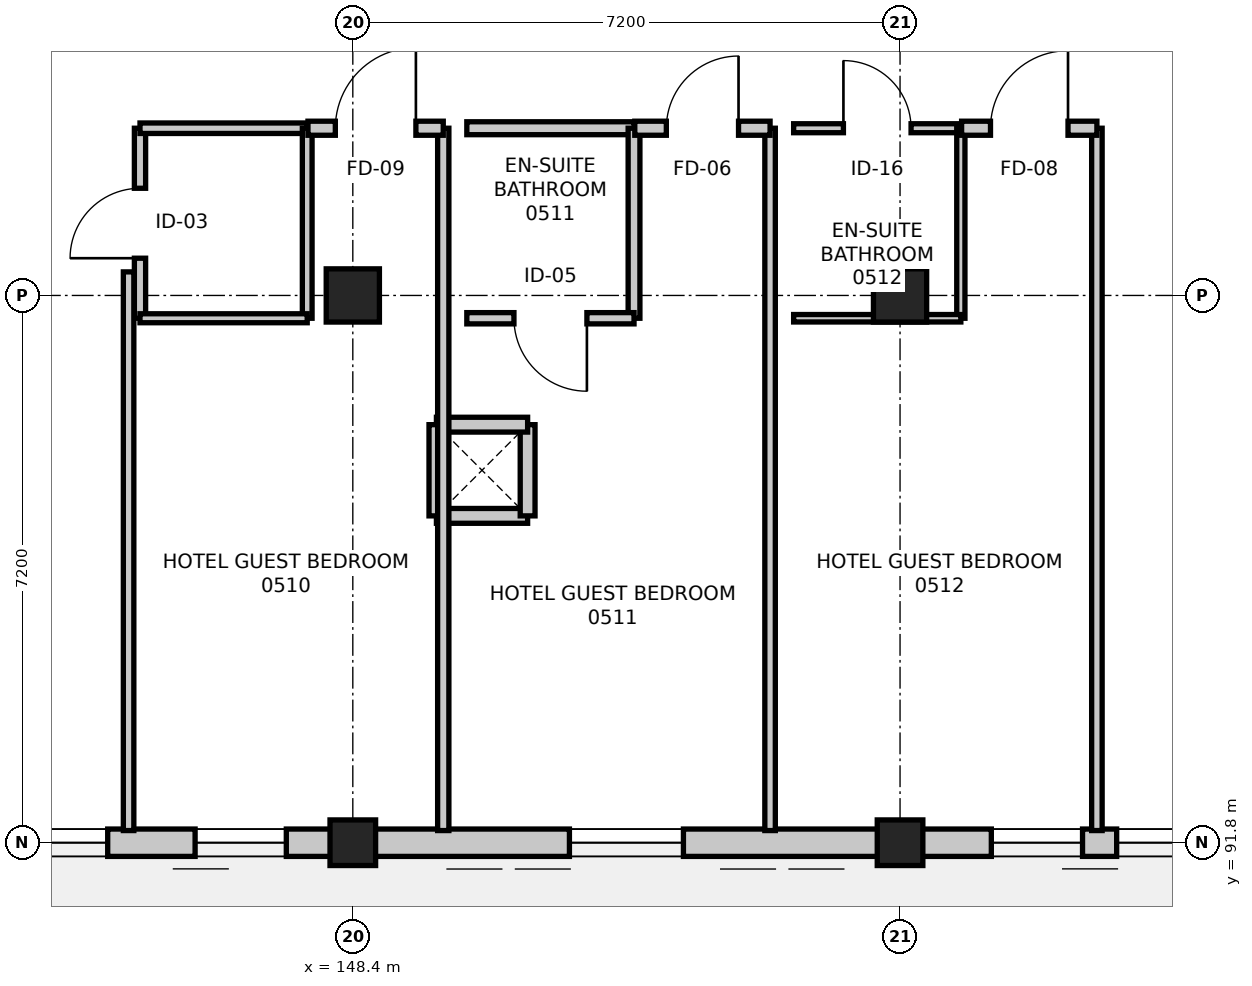
"""IFC4 building model, lengths in metres.
Left out: names, types, materials, properties, quantities, classifications, styles, units other than length and angle.
Written with IfcOpenShell. Run it as: python <this file> out.ifc"""

import sys

from ifc_helpers import new_model, si_unit, direction, frame, frame_2d, origin, origin_2d, place, context, subcontext, project, spatial, rectangle, extrude, element, fill, save


model = new_model("IFC4")
c1 = context("Model", 3, precision=1e-05, world=origin(), true_north=direction((0.0, 1.0)))
c2 = subcontext(c1, "Body", "Model", "MODEL_VIEW")
j1 = project(units=[si_unit("LENGTHUNIT", "METRE"), si_unit("PLANEANGLEUNIT", "RADIAN")], contexts=[c1])
p1 = place(None, origin())
s1 = spatial("IfcSite", under=j1, at=p1, CompositionType="ELEMENT")
p2 = place(p1, origin())
s2 = spatial("IfcBuilding", under=s1, at=p2, CompositionType="ELEMENT")
p3 = place(p2, frame((0.0, 0.0, 22.8)))
s3 = spatial("IfcBuildingStorey", under=s2, at=p3, CompositionType="ELEMENT", Elevation=22.8)
p4 = place(p3, frame((148.4, 91.8, 0.0), z_axis=(0.0, 0.0, 1.0), x_axis=(1.0, 0.0, 0.0)))
e1 = element("IfcColumn", 1, at=p4, inside=s3, PredefinedType="COLUMN", context=c2, shape_type="SweptSolid", body=[
    extrude(rectangle(XDim=0.6, YDim=0.6, at=origin_2d()), origin(), (0.0, 0.0, 1.0), 3.6),
])
p5 = place(p3, frame((148.4, 99.0, 0.0), z_axis=(0.0, 0.0, 1.0), x_axis=(1.0, 0.0, 0.0)))
e2 = element("IfcColumn", 2, at=p5, inside=s3, PredefinedType="COLUMN", context=c2, shape_type="SweptSolid", body=[
    extrude(rectangle(XDim=0.7, YDim=0.7, at=origin_2d()), origin(), (0.0, 0.0, 1.0), 3.6),
])
p6 = place(p3, frame((155.6, 91.8, 0.0), z_axis=(0.0, 0.0, 1.0), x_axis=(1.0, 0.0, 0.0)))
e3 = element("IfcColumn", 3, at=p6, inside=s3, PredefinedType="COLUMN", context=c2, shape_type="SweptSolid", body=[
    extrude(rectangle(XDim=0.6, YDim=0.6, at=origin_2d()), origin(), (0.0, 0.0, 1.0), 3.6),
])
p7 = place(p3, frame((155.6, 99.0, 0.0), z_axis=(0.0, 0.0, 1.0), x_axis=(1.0, 0.0, 0.0)))
e4 = element("IfcColumn", 4, at=p7, inside=s3, PredefinedType="COLUMN", context=c2, shape_type="SweptSolid", body=[
    extrude(rectangle(XDim=0.7, YDim=0.7, at=origin_2d()), origin(), (0.0, 0.0, 1.0), 3.6),
])
p8 = place(p3, frame((162.8, 91.8, 0.0), z_axis=(0.0, 0.0, 1.0), x_axis=(-1.0, 0.0, 0.0)))
e5 = element("IfcWall", 5, at=p8, inside=s3, PredefinedType="STANDARD", context=c2, shape_type="SweptSolid", body=[
    extrude(rectangle(XDim=7.2, YDim=0.36, at=frame_2d((3.6, 0.0))), origin(), (0.0, 0.0, 1.0), 2.735),
])
p9 = place(p8, frame((2.85, 0.0, 0.75)))
e6 = element("IfcOpeningElement", 6, at=p9, cuts=e5, PredefinedType="OPENING", context=c2, shape_type="SweptSolid", body=[
    extrude(rectangle(XDim=1.5, YDim=1.5, at=frame_2d((0.75, 0.75))), frame((0.0, 0.19, 0.0), z_axis=(0.0, -1.0, 0.0), x_axis=(1.0, 0.0, 0.0)), (0.0, 0.0, 1.0), 0.38),
])
p10 = place(p8, frame((4.799, 0.0, 0.85)))
e7 = element("IfcOpeningElement", 7, at=p10, cuts=e5, PredefinedType="OPENING", context=c2, shape_type="SweptSolid", body=[
    extrude(rectangle(XDim=1.2, YDim=1.8, at=frame_2d((0.6, 0.9))), frame((0.0, 0.19, 0.0), z_axis=(0.0, -1.0, 0.0), x_axis=(1.0, 0.0, 0.0)), (0.0, 0.0, 1.0), 0.38),
])
p11 = place(p3, frame((155.6, 91.8, 0.0), z_axis=(0.0, 0.0, 1.0), x_axis=(-1.0, 0.0, 0.0)))
e8 = element("IfcWall", 8, at=p11, inside=s3, PredefinedType="STANDARD", context=c2, shape_type="SweptSolid", body=[
    extrude(rectangle(XDim=7.2, YDim=0.36, at=frame_2d((3.6, 0.0))), origin(), (0.0, 0.0, 1.0), 2.735),
])
p12 = place(p11, frame((2.85, 0.0, 0.75)))
e9 = element("IfcOpeningElement", 9, at=p12, cuts=e8, PredefinedType="OPENING", context=c2, shape_type="SweptSolid", body=[
    extrude(rectangle(XDim=1.5, YDim=1.5, at=frame_2d((0.75, 0.75))), frame((0.0, 0.19, 0.0), z_axis=(0.0, -1.0, 0.0), x_axis=(1.0, 0.0, 0.0)), (0.0, 0.0, 1.0), 0.38),
])
p13 = place(p3, frame((148.4, 91.8, 0.0), z_axis=(0.0, 0.0, 1.0), x_axis=(-1.0, 0.0, 0.0)))
e10 = element("IfcWall", 10, at=p13, inside=s3, PredefinedType="STANDARD", context=c2, shape_type="SweptSolid", body=[
    extrude(rectangle(XDim=7.2, YDim=0.36, at=frame_2d((3.6, 0.0))), origin(), (0.0, 0.0, 1.0), 2.735),
])
p14 = place(p13, frame((0.875, 0.0, 0.75)))
e11 = element("IfcOpeningElement", 11, at=p14, cuts=e10, PredefinedType="OPENING", context=c2, shape_type="SweptSolid", body=[
    extrude(rectangle(XDim=1.2, YDim=1.5, at=frame_2d((0.6, 0.75))), frame((0.0, 0.19, 0.0), z_axis=(0.0, -1.0, 0.0), x_axis=(1.0, 0.0, 0.0)), (0.0, 0.0, 1.0), 0.38),
])
p15 = place(p13, frame((3.225, 0.0, 0.75)))
e12 = element("IfcOpeningElement", 12, at=p15, cuts=e10, PredefinedType="OPENING", context=c2, shape_type="SweptSolid", body=[
    extrude(rectangle(XDim=1.2, YDim=1.5, at=frame_2d((0.6, 0.75))), frame((0.0, 0.19, 0.0), z_axis=(0.0, -1.0, 0.0), x_axis=(1.0, 0.0, 0.0)), (0.0, 0.0, 1.0), 0.38),
])
p16 = place(p13, frame((5.35, 0.0, 0.75)))
e13 = element("IfcOpeningElement", 13, at=p16, cuts=e10, PredefinedType="OPENING", context=c2, shape_type="SweptSolid", body=[
    extrude(rectangle(XDim=1.2, YDim=1.5, at=frame_2d((0.6, 0.75))), frame((0.0, 0.19, 0.0), z_axis=(0.0, -1.0, 0.0), x_axis=(1.0, 0.0, 0.0)), (0.0, 0.0, 1.0), 0.38),
])
for number, where, z_axis, x_axis in (
    (14, (149.5, 96.1, 0.0), (0.0, 0.0, 1.0), (1.0, 0.0, 0.0)),
    (15, (150.7, 96.1, 0.0), (0.0, 0.0, 1.0), (0.0, 1.0, 0.0)),
    (16, (150.7, 97.3, 0.0), (0.0, 0.0, 1.0), (-1.0, 0.0, 0.0)),
    (17, (149.5, 97.3, 0.0), (0.0, 0.0, 1.0), (0.0, -1.0, 0.0)),
):
    element("IfcWall", number, at=place(p3, frame(where, z_axis=z_axis, x_axis=x_axis)), inside=s3, PredefinedType="PARAPET", context=c2, shape_type="SweptSolid", body=[
        extrude(rectangle(XDim=1.2, YDim=0.195, at=frame_2d((0.6, 0.0))), origin(), (0.0, 0.0, 1.0), 3.35),
    ])
p17 = place(p3, frame((145.6, 98.7, 0.0), z_axis=(0.0, 0.0, 1.0), x_axis=(0.0, 1.0, 0.0)))
e18 = element("IfcWall", 18, at=p17, inside=s3, PredefinedType="PARTITIONING", context=c2, shape_type="SweptSolid", body=[
    extrude(rectangle(XDim=2.5, YDim=0.148, at=frame_2d((1.25, 0.0))), origin(), (0.0, 0.0, 1.0), 2.735),
])
p18 = place(p17, frame((0.79, 0.0, 0.0)))
e19 = element("IfcOpeningElement", 19, at=p18, cuts=e18, PredefinedType="OPENING", context=c2, shape_type="SweptSolid", body=[
    extrude(rectangle(XDim=0.92, YDim=2.1, at=frame_2d((0.46, 1.05))), frame((0.0, 0.084, 0.0), z_axis=(0.0, -1.0, 0.0), x_axis=(1.0, 0.0, 0.0)), (0.0, 0.0, 1.0), 0.168),
])
p19 = place(p3, frame((145.6, 101.2, 0.0), z_axis=(0.0, 0.0, 1.0), x_axis=(1.0, 0.0, 0.0)))
e20 = element("IfcWall", 20, at=p19, inside=s3, PredefinedType="PARTITIONING", context=c2, shape_type="SweptSolid", body=[
    extrude(rectangle(XDim=2.2, YDim=0.138, at=frame_2d((1.1, 0.0))), origin(), (0.0, 0.0, 1.0), 3.35),
])
p20 = place(p3, frame((147.8, 101.2, 0.0), z_axis=(0.0, 0.0, 1.0), x_axis=(0.0, -1.0, 0.0)))
e21 = element("IfcWall", 21, at=p20, inside=s3, PredefinedType="PARTITIONING", context=c2, shape_type="SweptSolid", body=[
    extrude(rectangle(XDim=2.5, YDim=0.128, at=frame_2d((1.25, 0.0))), origin(), (0.0, 0.0, 1.0), 2.735),
])
p21 = place(p3, frame((147.8, 98.7, 0.0), z_axis=(0.0, 0.0, 1.0), x_axis=(-1.0, 0.0, 0.0)))
e22 = element("IfcWall", 22, at=p21, inside=s3, PredefinedType="PARTITIONING", context=c2, shape_type="SweptSolid", body=[
    extrude(rectangle(XDim=2.2, YDim=0.118, at=frame_2d((1.1, 0.0))), origin(), (0.0, 0.0, 1.0), 3.35),
])
p22 = place(p3, frame((149.59, 101.2, 0.0), z_axis=(0.0, 0.0, 1.0), x_axis=(0.0, -1.0, 0.0)))
e23 = element("IfcWall", 23, at=p22, inside=s3, PredefinedType="PARTITIONING", context=c2, shape_type="SweptSolid", body=[
    extrude(rectangle(XDim=9.24, YDim=0.148, at=frame_2d((4.62, 0.0))), origin(), (0.0, 0.0, 1.0), 2.735),
])
p23 = place(p3, frame((145.45, 91.96, 0.0), z_axis=(0.0, 0.0, 1.0), x_axis=(0.0, 1.0, 0.0)))
e24 = element("IfcWall", 24, at=p23, inside=s3, PredefinedType="PARTITIONING", context=c2, shape_type="SweptSolid", body=[
    extrude(rectangle(XDim=7.35, YDim=0.138, at=frame_2d((3.675, 0.0))), origin(), (0.0, 0.0, 1.0), 2.735),
])
p24 = place(p3, frame((147.81, 101.2, 0.0), z_axis=(0.0, 0.0, 1.0), x_axis=(1.0, 0.0, 0.0)))
e25 = element("IfcWall", 25, at=p24, inside=s3, PredefinedType="PARTITIONING", context=c2, shape_type="SweptSolid", body=[
    extrude(rectangle(XDim=1.78, YDim=0.185, at=frame_2d((0.89, 0.0))), origin(), (0.0, 0.0, 1.0), 2.685),
])
p25 = place(p24, frame((0.36, 0.0, 0.0)))
e26 = element("IfcOpeningElement", 26, at=p25, cuts=e25, PredefinedType="OPENING", context=c2, shape_type="SweptSolid", body=[
    extrude(rectangle(XDim=1.06, YDim=2.2, at=frame_2d((0.53, 1.1))), frame((0.0, 0.103, 0.0), z_axis=(0.0, -1.0, 0.0), x_axis=(1.0, 0.0, 0.0)), (0.0, 0.0, 1.0), 0.205),
])
p26 = place(p3, frame((149.9, 101.2, 0.0), z_axis=(0.0, 0.0, 1.0), x_axis=(1.0, 0.0, 0.0)))
e27 = element("IfcWall", 27, at=p26, inside=s3, PredefinedType="PARTITIONING", context=c2, shape_type="SweptSolid", body=[
    extrude(rectangle(XDim=2.2, YDim=0.17, at=frame_2d((1.1, 0.0))), origin(), (0.0, 0.0, 1.0), 3.35),
])
p27 = place(p3, frame((152.1, 101.2, 0.0), z_axis=(0.0, 0.0, 1.0), x_axis=(0.0, -1.0, 0.0)))
e28 = element("IfcWall", 28, at=p27, inside=s3, PredefinedType="PARTITIONING", context=c2, shape_type="SweptSolid", body=[
    extrude(rectangle(XDim=2.5, YDim=0.155, at=frame_2d((1.25, 0.0))), origin(), (0.0, 0.0, 1.0), 2.735),
])
p28 = place(p3, frame((152.1, 98.7, 0.0), z_axis=(0.0, 0.0, 1.0), x_axis=(-1.0, 0.0, 0.0)))
e29 = element("IfcWall", 29, at=p28, inside=s3, PredefinedType="PARTITIONING", context=c2, shape_type="SweptSolid", body=[
    extrude(rectangle(XDim=2.2, YDim=0.148, at=frame_2d((1.1, 0.0))), origin(), (0.0, 0.0, 1.0), 3.35),
])
p29 = place(p28, frame((0.62, 0.0, 0.0)))
e30 = element("IfcOpeningElement", 30, at=p29, cuts=e29, PredefinedType="OPENING", context=c2, shape_type="SweptSolid", body=[
    extrude(rectangle(XDim=0.96, YDim=2.14, at=frame_2d((0.48, 1.07))), frame((0.0, 0.084, 0.0), z_axis=(0.0, -1.0, 0.0), x_axis=(1.0, 0.0, 0.0)), (0.0, 0.0, 1.0), 0.168),
])
p30 = place(p3, frame((153.89, 101.2, 0.0), z_axis=(0.0, 0.0, 1.0), x_axis=(0.0, -1.0, 0.0)))
e31 = element("IfcWall", 31, at=p30, inside=s3, PredefinedType="PARTITIONING", context=c2, shape_type="SweptSolid", body=[
    extrude(rectangle(XDim=9.24, YDim=0.138, at=frame_2d((4.62, 0.0))), origin(), (0.0, 0.0, 1.0), 2.735),
])
p31 = place(p3, frame((152.11, 101.2, 0.0), z_axis=(0.0, 0.0, 1.0), x_axis=(1.0, 0.0, 0.0)))
e32 = element("IfcWall", 32, at=p31, inside=s3, PredefinedType="PARTITIONING", context=c2, shape_type="SweptSolid", body=[
    extrude(rectangle(XDim=1.78, YDim=0.185, at=frame_2d((0.89, 0.0))), origin(), (0.0, 0.0, 1.0), 3.35),
])
p32 = place(p31, frame((0.415, 0.0, 0.0)))
e33 = element("IfcOpeningElement", 33, at=p32, cuts=e32, PredefinedType="OPENING", context=c2, shape_type="SweptSolid", body=[
    extrude(rectangle(XDim=0.95, YDim=2.1, at=frame_2d((0.475, 1.05))), frame((0.0, 0.103, 0.0), z_axis=(0.0, -1.0, 0.0), x_axis=(1.0, 0.0, 0.0)), (0.0, 0.0, 1.0), 0.205),
])
p33 = place(p3, frame((154.2, 101.2, 0.0), z_axis=(0.0, 0.0, 1.0), x_axis=(1.0, 0.0, 0.0)))
e34 = element("IfcWall", 34, at=p33, inside=s3, PredefinedType="PARTITIONING", context=c2, shape_type="SweptSolid", body=[
    extrude(rectangle(XDim=2.2, YDim=0.118, at=frame_2d((1.1, 0.0))), origin(), (0.0, 0.0, 1.0), 2.685),
])
p34 = place(p33, frame((0.655, 0.0, 0.0)))
e35 = element("IfcOpeningElement", 35, at=p34, cuts=e34, PredefinedType="OPENING", context=c2, shape_type="SweptSolid", body=[
    extrude(rectangle(XDim=0.89, YDim=2.09, at=frame_2d((0.445, 1.045))), frame((0.0, 0.069, 0.0), z_axis=(0.0, -1.0, 0.0), x_axis=(1.0, 0.0, 0.0)), (0.0, 0.0, 1.0), 0.138),
])
p35 = place(p3, frame((156.4, 101.2, 0.0), z_axis=(0.0, 0.0, 1.0), x_axis=(0.0, -1.0, 0.0)))
e36 = element("IfcWall", 36, at=p35, inside=s3, PredefinedType="PARTITIONING", context=c2, shape_type="SweptSolid", body=[
    extrude(rectangle(XDim=2.5, YDim=0.108, at=frame_2d((1.25, 0.0))), origin(), (0.0, 0.0, 1.0), 2.735),
])
p36 = place(p3, frame((156.4, 98.7, 0.0), z_axis=(0.0, 0.0, 1.0), x_axis=(-1.0, 0.0, 0.0)))
e37 = element("IfcWall", 37, at=p36, inside=s3, PredefinedType="PARTITIONING", context=c2, shape_type="SweptSolid", body=[
    extrude(rectangle(XDim=2.2, YDim=0.098, at=frame_2d((1.1, 0.0))), origin(), (0.0, 0.0, 1.0), 2.685),
])
p37 = place(p3, frame((158.19, 101.2, 0.0), z_axis=(0.0, 0.0, 1.0), x_axis=(0.0, -1.0, 0.0)))
e38 = element("IfcWall", 38, at=p37, inside=s3, PredefinedType="PARTITIONING", context=c2, shape_type="SweptSolid", body=[
    extrude(rectangle(XDim=9.24, YDim=0.138, at=frame_2d((4.62, 0.0))), origin(), (0.0, 0.0, 1.0), 2.735),
])
p38 = place(p3, frame((156.41, 101.2, 0.0), z_axis=(0.0, 0.0, 1.0), x_axis=(1.0, 0.0, 0.0)))
e39 = element("IfcWall", 39, at=p38, inside=s3, PredefinedType="PARTITIONING", context=c2, shape_type="SweptSolid", body=[
    extrude(rectangle(XDim=1.78, YDim=0.185, at=frame_2d((0.89, 0.0))), origin(), (0.0, 0.0, 1.0), 3.35),
])
p39 = place(p38, frame((0.38, 0.0, 0.0)))
e40 = element("IfcOpeningElement", 40, at=p39, cuts=e39, PredefinedType="OPENING", context=c2, shape_type="SweptSolid", body=[
    extrude(rectangle(XDim=1.02, YDim=2.15, at=frame_2d((0.51, 1.075))), frame((0.0, 0.103, 0.0), z_axis=(0.0, -1.0, 0.0), x_axis=(1.0, 0.0, 0.0)), (0.0, 0.0, 1.0), 0.205),
])
p40 = place(p9, origin())
e41 = element("IfcWindow", 41, at=p40, inside=s3, PartitioningType="SINGLE_PANEL", PredefinedType="WINDOW", context=c2, shape_type="SweptSolid", body=[
    extrude(rectangle(XDim=1.5, YDim=1.5, at=frame_2d((0.75, 0.75))), frame((0.0, 0.03, 0.0), z_axis=(0.0, -1.0, 0.0), x_axis=(1.0, 0.0, 0.0)), (0.0, 0.0, 1.0), 0.06),
])
fill(e6, e41)
p41 = place(p12, origin())
e42 = element("IfcWindow", 42, at=p41, inside=s3, PartitioningType="SINGLE_PANEL", PredefinedType="WINDOW", context=c2, shape_type="SweptSolid", body=[
    extrude(rectangle(XDim=1.5, YDim=1.5, at=frame_2d((0.75, 0.75))), frame((0.0, 0.03, 0.0), z_axis=(0.0, -1.0, 0.0), x_axis=(1.0, 0.0, 0.0)), (0.0, 0.0, 1.0), 0.06),
])
fill(e9, e42)
p42 = place(p14, origin())
e43 = element("IfcWindow", 43, at=p42, inside=s3, PartitioningType="SINGLE_PANEL", PredefinedType="WINDOW", context=c2, shape_type="SweptSolid", body=[
    extrude(rectangle(XDim=1.2, YDim=1.5, at=frame_2d((0.6, 0.75))), frame((0.0, 0.03, 0.0), z_axis=(0.0, -1.0, 0.0), x_axis=(1.0, 0.0, 0.0)), (0.0, 0.0, 1.0), 0.06),
])
fill(e11, e43)
p43 = place(p18, origin())
e44 = element("IfcDoor", 44, at=p43, inside=s3, OperationType="SINGLE_SWING_LEFT", PredefinedType="DOOR", context=c2, shape_type="SweptSolid", body=[
    extrude(rectangle(XDim=0.92, YDim=2.1, at=frame_2d((0.46, 1.05))), frame((0.0, 0.025, 0.0), z_axis=(0.0, -1.0, 0.0), x_axis=(1.0, 0.0, 0.0)), (0.0, 0.0, 1.0), 0.05),
])
fill(e19, e44)
p44 = place(p25, origin())
e45 = element("IfcDoor", 45, at=p44, inside=s3, OperationType="SINGLE_SWING_RIGHT", PredefinedType="DOOR", context=c2, shape_type="SweptSolid", body=[
    extrude(rectangle(XDim=1.06, YDim=2.2, at=frame_2d((0.53, 1.1))), frame((0.0, 0.025, 0.0), z_axis=(0.0, -1.0, 0.0), x_axis=(1.0, 0.0, 0.0)), (0.0, 0.0, 1.0), 0.05),
])
fill(e26, e45)
p45 = place(p29, origin())
e46 = element("IfcDoor", 46, at=p45, inside=s3, OperationType="SINGLE_SWING_LEFT", PredefinedType="DOOR", context=c2, shape_type="SweptSolid", body=[
    extrude(rectangle(XDim=0.96, YDim=2.14, at=frame_2d((0.48, 1.07))), frame((0.0, 0.025, 0.0), z_axis=(0.0, -1.0, 0.0), x_axis=(1.0, 0.0, 0.0)), (0.0, 0.0, 1.0), 0.05),
])
fill(e30, e46)
p46 = place(p32, origin())
e47 = element("IfcDoor", 47, at=p46, inside=s3, OperationType="SINGLE_SWING_RIGHT", PredefinedType="DOOR", context=c2, shape_type="SweptSolid", body=[
    extrude(rectangle(XDim=0.95, YDim=2.1, at=frame_2d((0.475, 1.05))), frame((0.0, 0.025, 0.0), z_axis=(0.0, -1.0, 0.0), x_axis=(1.0, 0.0, 0.0)), (0.0, 0.0, 1.0), 0.05),
])
fill(e33, e47)
p47 = place(p34, origin())
e48 = element("IfcDoor", 48, at=p47, inside=s3, OperationType="SINGLE_SWING_LEFT", PredefinedType="DOOR", context=c2, shape_type="SweptSolid", body=[
    extrude(rectangle(XDim=0.89, YDim=2.09, at=frame_2d((0.445, 1.045))), frame((0.0, 0.025, 0.0), z_axis=(0.0, -1.0, 0.0), x_axis=(1.0, 0.0, 0.0)), (0.0, 0.0, 1.0), 0.05),
])
fill(e35, e48)
p48 = place(p39, origin())
e49 = element("IfcDoor", 49, at=p48, inside=s3, OperationType="SINGLE_SWING_RIGHT", PredefinedType="DOOR", context=c2, shape_type="SweptSolid", body=[
    extrude(rectangle(XDim=1.02, YDim=2.15, at=frame_2d((0.51, 1.075))), frame((0.0, 0.025, 0.0), z_axis=(0.0, -1.0, 0.0), x_axis=(1.0, 0.0, 0.0)), (0.0, 0.0, 1.0), 0.05),
])
fill(e40, e49)
p49 = place(p15, origin())
e50 = element("IfcWindow", 50, at=p49, inside=s3, PartitioningType="SINGLE_PANEL", PredefinedType="WINDOW", context=c2, shape_type="SweptSolid", body=[
    extrude(rectangle(XDim=1.2, YDim=1.5, at=frame_2d((0.6, 0.75))), frame((0.0, 0.03, 0.0), z_axis=(0.0, -1.0, 0.0), x_axis=(1.0, 0.0, 0.0)), (0.0, 0.0, 1.0), 0.06),
])
fill(e12, e50)
p50 = place(p10, origin())
e51 = element("IfcWindow", 51, at=p50, inside=s3, PartitioningType="SINGLE_PANEL", PredefinedType="WINDOW", context=c2, shape_type="SweptSolid", body=[
    extrude(rectangle(XDim=1.2, YDim=1.8, at=frame_2d((0.6, 0.9))), frame((0.0, 0.03, 0.0), z_axis=(0.0, -1.0, 0.0), x_axis=(1.0, 0.0, 0.0)), (0.0, 0.0, 1.0), 0.06),
])
fill(e7, e51)
save(model, sys.argv[1])
